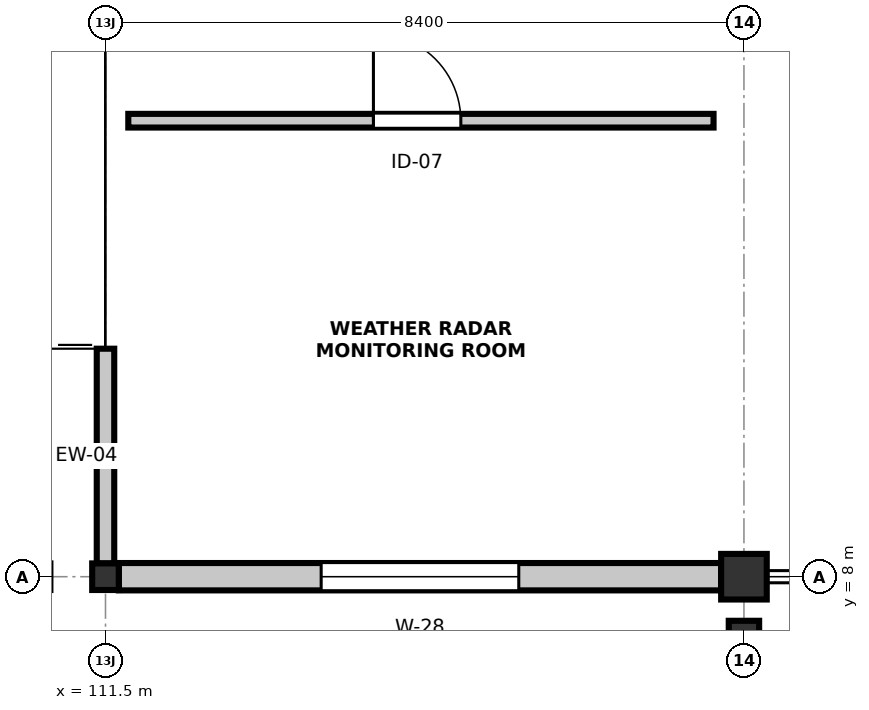
"""IFC4 building model, lengths in metres.
Left out: names, types, materials, properties, quantities, classifications, styles, units other than length and angle.
Written with IfcOpenShell. Run it as: python <this file> out.ifc"""

import sys

from ifc_helpers import new_model, si_unit, direction, frame, frame_2d, origin, origin_2d, place, context, subcontext, project, spatial, rectangle, i_section, extrude, element, fill, save


model = new_model("IFC4")
c1 = context("Model", 3, precision=1e-05, world=origin(), true_north=direction((0.0, 1.0)))
c2 = subcontext(c1, "Body", "Model", "MODEL_VIEW")
j1 = project(units=[si_unit("LENGTHUNIT", "METRE"), si_unit("PLANEANGLEUNIT", "RADIAN")], contexts=[c1])
p1 = place(None, origin())
s1 = spatial("IfcSite", under=j1, at=p1, CompositionType="ELEMENT")
p2 = place(p1, origin())
s2 = spatial("IfcBuilding", under=s1, at=p2, CompositionType="ELEMENT")
p3 = place(p2, frame((0.0, 0.0, 14.4)))
s3 = spatial("IfcBuildingStorey", under=s2, at=p3, CompositionType="ELEMENT", Elevation=14.4)
p4 = place(p3, frame((111.5, 8.0, 0.0), z_axis=(0.0, 0.0, 1.0), x_axis=(1.0, 0.0, 0.0)))
e1 = element("IfcColumn", 1, at=p4, inside=s3, PredefinedType="COLUMN", context=c2, shape_type="SweptSolid", body=[
    extrude(i_section(OverallWidth=0.35, OverallDepth=0.35, WebThickness=0.012, FlangeThickness=0.019, FilletRadius=0.02, at=origin_2d()), origin(), (0.0, 0.0, 1.0), 4.8),
])
p5 = place(p3, frame((119.9, 8.0, 0.0), z_axis=(0.0, 0.0, 1.0), x_axis=(1.0, 0.0, 0.0)))
e2 = element("IfcColumn", 2, at=p5, inside=s3, PredefinedType="COLUMN", context=c2, shape_type="SweptSolid", body=[
    extrude(rectangle(XDim=0.6, YDim=0.6, at=origin_2d()), origin(), (0.0, 0.0, 1.0), 4.8),
])
p6 = place(p3, frame((119.9, 7.095, 0.0), z_axis=(0.0, 0.0, 1.0), x_axis=(1.0, 0.0, 0.0)))
e3 = element("IfcColumn", 3, at=p6, inside=s3, PredefinedType="PILASTER", context=c2, shape_type="SweptSolid", body=[
    extrude(rectangle(XDim=0.4, YDim=0.65, at=origin_2d()), origin(), (0.0, 0.0, 1.0), 4.8),
])
p7 = place(p3, frame((111.675, 8.0, 0.0), z_axis=(0.0, 0.0, 1.0), x_axis=(1.0, 0.0, 0.0)))
e4 = element("IfcWall", 4, at=p7, inside=s3, PredefinedType="STANDARD", context=c2, shape_type="SweptSolid", body=[
    extrude(rectangle(XDim=7.925, YDim=0.36, at=frame_2d((3.962, 0.0))), origin(), (0.0, 0.0, 1.0), 3.615),
])
p8 = place(p7, frame((2.663, 0.0, 0.95)))
e5 = element("IfcOpeningElement", 5, at=p8, cuts=e4, PredefinedType="OPENING", context=c2, shape_type="SweptSolid", body=[
    extrude(rectangle(XDim=2.6, YDim=2.15, at=frame_2d((1.3, 1.075))), frame((0.0, 0.19, 0.0), z_axis=(0.0, -1.0, 0.0), x_axis=(1.0, 0.0, 0.0)), (0.0, 0.0, 1.0), 0.38),
])
p9 = place(p3, frame((111.5, 8.175, 0.0), z_axis=(0.0, 0.0, 1.0), x_axis=(0.0, 1.0, 0.0)))
e6 = element("IfcWall", 6, at=p9, inside=s3, PredefinedType="STANDARD", context=c2, shape_type="SweptSolid", body=[
    extrude(rectangle(XDim=2.825, YDim=0.23, at=frame_2d((1.413, 0.0))), origin(), (0.0, 0.0, 1.0), 3.615),
])
p10 = place(p3, frame((111.8, 14.0, 0.0), z_axis=(0.0, 0.0, 1.0), x_axis=(1.0, 0.0, 0.0)))
e7 = element("IfcWall", 7, at=p10, inside=s3, PredefinedType="PARTITIONING", context=c2, shape_type="SweptSolid", body=[
    extrude(rectangle(XDim=7.7, YDim=0.18, at=frame_2d((3.85, 0.0))), origin(), (0.0, 0.0, 1.0), 3.615),
])
p11 = place(p10, frame((3.225, 0.0, 0.0)))
e8 = element("IfcOpeningElement", 8, at=p11, cuts=e7, PredefinedType="OPENING", context=c2, shape_type="SweptSolid", body=[
    extrude(rectangle(XDim=1.15, YDim=2.15, at=frame_2d((0.575, 1.075))), frame((0.0, 0.1, 0.0), z_axis=(0.0, -1.0, 0.0), x_axis=(1.0, 0.0, 0.0)), (0.0, 0.0, 1.0), 0.2),
])
p12 = place(p8, origin())
e9 = element("IfcWindow", 9, at=p12, inside=s3, PartitioningType="SINGLE_PANEL", PredefinedType="WINDOW", context=c2, shape_type="SweptSolid", body=[
    extrude(rectangle(XDim=2.6, YDim=2.15, at=frame_2d((1.3, 1.075))), frame((0.0, 0.03, 0.0), z_axis=(0.0, -1.0, 0.0), x_axis=(1.0, 0.0, 0.0)), (0.0, 0.0, 1.0), 0.06),
])
fill(e5, e9)
p13 = place(p11, origin())
e10 = element("IfcDoor", 10, at=p13, inside=s3, OperationType="SINGLE_SWING_LEFT", PredefinedType="DOOR", context=c2, shape_type="SweptSolid", body=[
    extrude(rectangle(XDim=1.15, YDim=2.15, at=frame_2d((0.575, 1.075))), frame((0.0, 0.025, 0.0), z_axis=(0.0, -1.0, 0.0), x_axis=(1.0, 0.0, 0.0)), (0.0, 0.0, 1.0), 0.05),
])
fill(e8, e10)
save(model, sys.argv[1])
